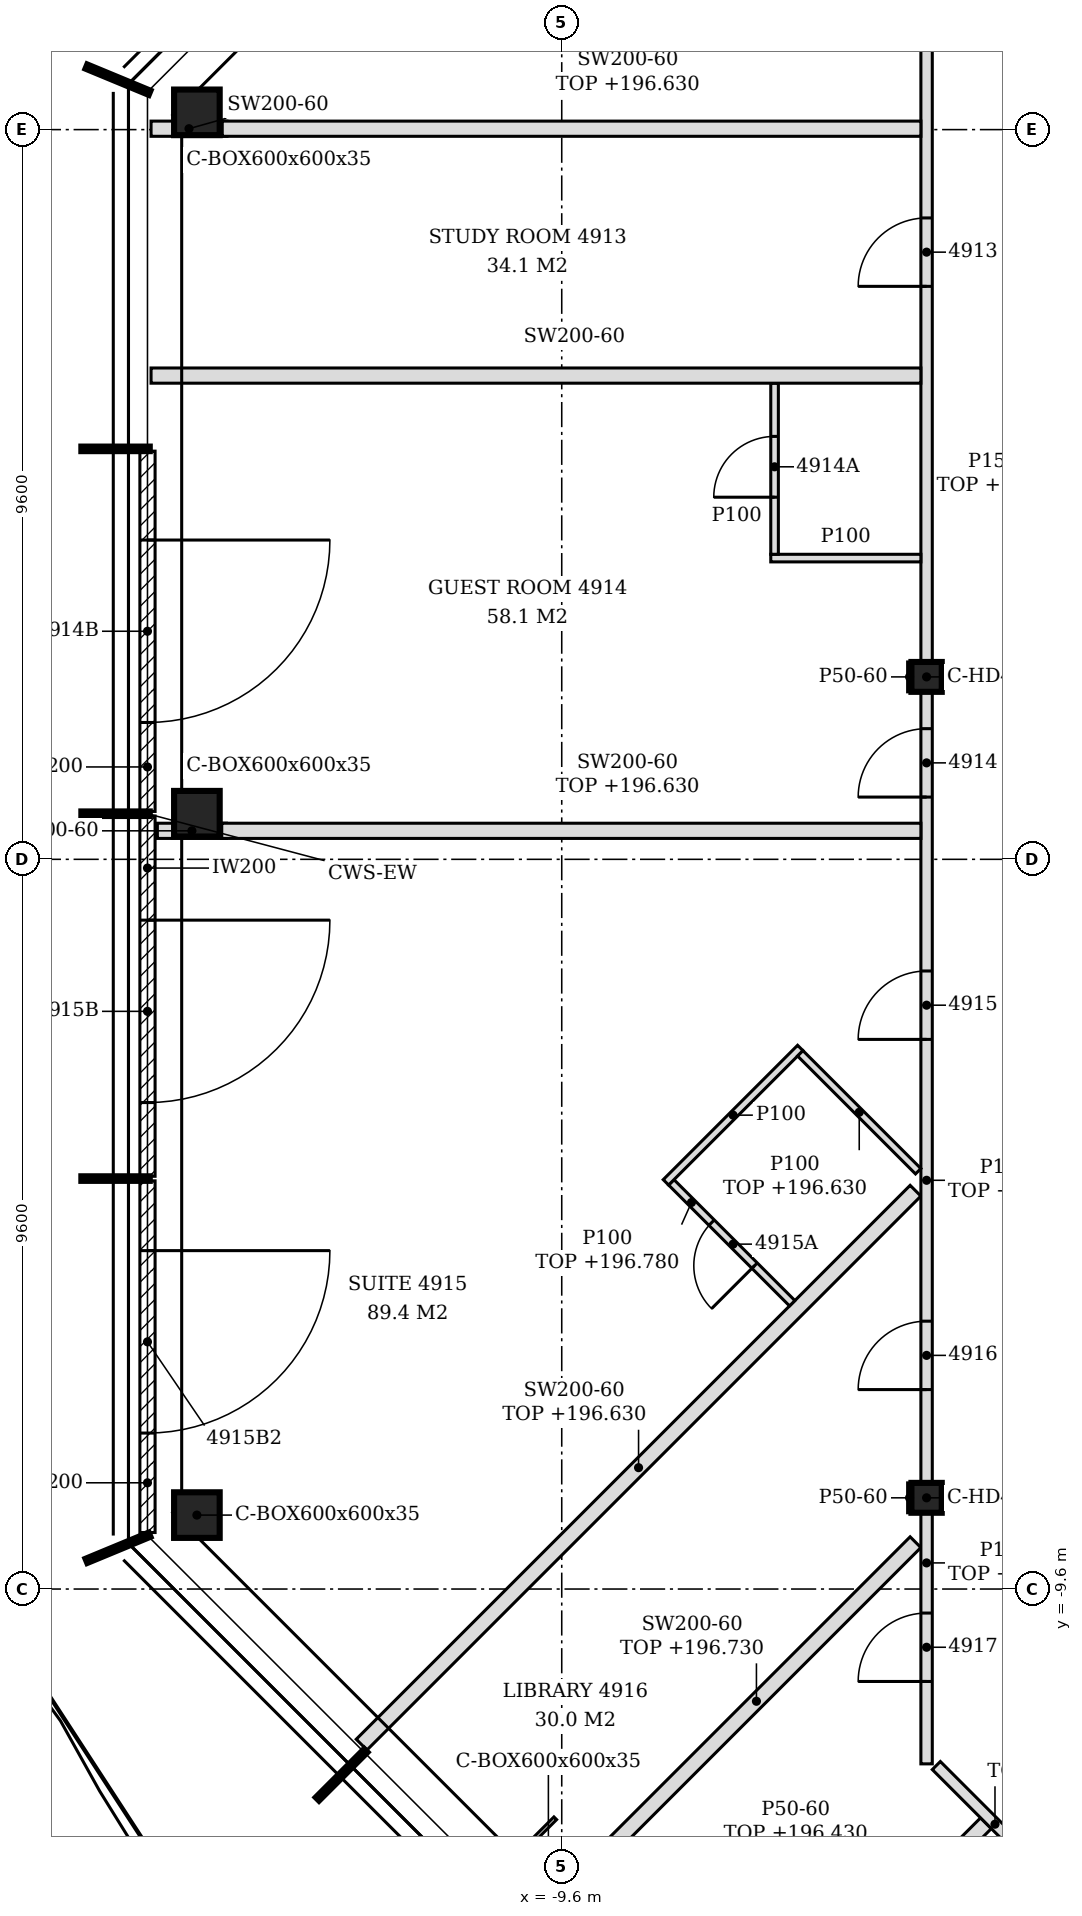
"""IFC4 building model, lengths in metres.
Left out: names, types, materials, properties, quantities, classifications, styles, units other than length and angle.
Written with IfcOpenShell. Run it as: python <this file> out.ifc"""

import sys

from ifc_helpers import new_model, si_unit, direction, frame, frame_2d, origin, origin_2d, place, context, subcontext, project, spatial, polyline, rectangle, hollow_rectangle, i_section, outline, extrude, clip, halfspace, element, fill, save


model = new_model("IFC4")
c1 = context("Model", 3, precision=1e-05, world=origin(), true_north=direction((0.0, 1.0)))
c2 = subcontext(c1, "Body", "Model", "MODEL_VIEW")
j1 = project(units=[si_unit("LENGTHUNIT", "METRE"), si_unit("PLANEANGLEUNIT", "RADIAN")], contexts=[c1])
p1 = place(None, origin())
s1 = spatial("IfcSite", under=j1, at=p1, CompositionType="ELEMENT")
p2 = place(p1, origin())
s2 = spatial("IfcBuilding", under=s1, at=p2, CompositionType="ELEMENT")
p3 = place(p2, frame((0.0, 0.0, 193.8)))
s3 = spatial("IfcBuildingStorey", under=s2, at=p3, CompositionType="ELEMENT", Elevation=193.8)
p4 = place(p3, frame((-14.4, 9.827, -0.15), z_axis=(0.182857646312, -0.121927149838, 0.975549512489), x_axis=(0.554769659169, 0.83200398152, 0.0)))
e1 = element("IfcColumn", 1, at=p4, inside=s3, PredefinedType="COLUMN", context=c2, shape_type="Clipping", body=[
    clip(clip(extrude(hollow_rectangle(XDim=0.6, YDim=0.6, WallThickness=0.035, at=origin_2d()), origin(), (0.0, 0.0, 1.0), 3.69), halfspace(frame((0.0, 0.0, 0.021), z_axis=(0.0, 0.0, 1.0), x_axis=(1.0, 0.0, 0.0)), True)), halfspace(frame((0.0, 0.0, 3.668), z_axis=(0.0, 0.0, 1.0), x_axis=(1.0, 0.0, 0.0)), False)),
])
p5 = place(p3, frame((-14.4, 0.6, -0.15), z_axis=(0.182856170941, -0.121992322437, 0.975541641354), x_axis=(0.55497797841, 0.831865039222, 0.0)))
e2 = element("IfcColumn", 2, at=p5, inside=s3, PredefinedType="COLUMN", context=c2, shape_type="Clipping", body=[
    clip(clip(extrude(hollow_rectangle(XDim=0.6, YDim=0.6, WallThickness=0.035, at=origin_2d()), origin(), (0.0, 0.0, 1.0), 3.69), halfspace(frame((0.0, 0.0, 0.021), z_axis=(0.0, 0.0, 1.0), x_axis=(1.0, 0.0, 0.0)), True)), halfspace(frame((0.0, 0.0, 3.668), z_axis=(0.0, 0.0, 1.0), x_axis=(1.0, 0.0, 0.0)), False)),
])
p6 = place(p3, frame((-14.4, -8.627, -0.15), z_axis=(0.182857646312, -0.121927149838, 0.975549512489), x_axis=(0.554769659169, 0.83200398152, 0.0)))
e3 = element("IfcColumn", 3, at=p6, inside=s3, PredefinedType="COLUMN", context=c2, shape_type="Clipping", body=[
    clip(clip(extrude(hollow_rectangle(XDim=0.6, YDim=0.6, WallThickness=0.035, at=origin_2d()), origin(), (0.0, 0.0, 1.0), 3.69), halfspace(frame((0.0, 0.0, 0.021), z_axis=(0.0, 0.0, 1.0), x_axis=(1.0, 0.0, 0.0)), True)), halfspace(frame((0.0, 0.0, 3.668), z_axis=(0.0, 0.0, 1.0), x_axis=(1.0, 0.0, 0.0)), False)),
])
p7 = place(p3, frame((-9.776, -13.251, -0.15), z_axis=(0.18292158996, -0.12192567461, 0.97553770906), x_axis=(0.55463074681, 0.832096589761, 0.0)))
e4 = element("IfcColumn", 4, at=p7, inside=s3, PredefinedType="COLUMN", context=c2, shape_type="Clipping", body=[
    clip(clip(extrude(hollow_rectangle(XDim=0.6, YDim=0.6, WallThickness=0.035, at=origin_2d()), origin(), (0.0, 0.0, 1.0), 3.69), halfspace(frame((0.0, 0.0, 0.021), z_axis=(0.0, 0.0, 1.0), x_axis=(1.0, 0.0, 0.0)), True)), halfspace(frame((0.0, 0.0, 3.668), z_axis=(0.0, 0.0, 1.0), x_axis=(1.0, 0.0, 0.0)), False)),
])
for number, where, z_axis, x_axis in (
    (5, (-4.8, -8.4, -0.15), (0.0, 0.0, 1.0), (1.0, 0.0, 0.0)),
    (6, (-4.8, 2.4, -0.15), (0.0, 0.0, 1.0), (1.0, 0.0, 0.0)),
):
    element("IfcColumn", number, at=place(p3, frame(where, z_axis=z_axis, x_axis=x_axis)), inside=s3, PredefinedType="COLUMN", context=c2, shape_type="SweptSolid", body=[
        extrude(i_section(OverallWidth=0.399, OverallDepth=0.393, WebThickness=0.023, FlangeThickness=0.037, FilletRadius=0.015, at=origin_2d()), origin(), (0.0, 0.0, 1.0), 3.6),
    ])
p8 = place(p3, frame((-15.05, 5.37, 0.0), z_axis=(0.0, 0.0, 1.0), x_axis=(0.0, -1.0, 0.0)))
e7 = element("IfcWall", 7, at=p8, inside=s3, PredefinedType="NOTDEFINED", context=c2, shape_type="SweptSolid", body=[
    extrude(rectangle(XDim=4.74, YDim=0.2, at=frame_2d((2.37, 0.0))), origin(), (0.0, 0.0, 1.0), 3.45),
])
p9 = place(p8, frame((1.169, 0.0, 0.0)))
e8 = element("IfcOpeningElement", 8, at=p9, cuts=e7, PredefinedType="OPENING", context=c2, shape_type="SweptSolid", body=[
    extrude(rectangle(XDim=2.4, YDim=2.4, at=frame_2d((1.2, 1.2))), frame((0.0, 0.11, 0.0), z_axis=(0.0, -1.0, 0.0), x_axis=(1.0, 0.0, 0.0)), (0.0, 0.0, 1.0), 0.22),
])
p10 = place(p3, frame((-15.05, 0.57, 0.0), z_axis=(0.0, 0.0, 1.0), x_axis=(0.0, -1.0, 0.0)))
e9 = element("IfcWall", 9, at=p10, inside=s3, PredefinedType="NOTDEFINED", context=c2, shape_type="SweptSolid", body=[
    extrude(rectangle(XDim=4.74, YDim=0.2, at=frame_2d((2.37, 0.0))), origin(), (0.0, 0.0, 1.0), 3.45),
])
p11 = place(p10, frame((1.37, 0.0, 0.0)))
e10 = element("IfcOpeningElement", 10, at=p11, cuts=e9, PredefinedType="OPENING", context=c2, shape_type="SweptSolid", body=[
    extrude(rectangle(XDim=2.4, YDim=2.4, at=frame_2d((1.2, 1.2))), frame((0.0, 0.11, 0.0), z_axis=(0.0, -1.0, 0.0), x_axis=(1.0, 0.0, 0.0)), (0.0, 0.0, 1.0), 0.22),
])
p12 = place(p3, frame((-15.05, -4.23, 0.0), z_axis=(0.0, 0.0, 1.0), x_axis=(0.0, -1.0, 0.0)))
e11 = element("IfcWall", 11, at=p12, inside=s3, PredefinedType="NOTDEFINED", context=c2, shape_type="SweptSolid", body=[
    extrude(rectangle(XDim=4.626, YDim=0.2, at=frame_2d((2.313, 0.0))), origin(), (0.0, 0.0, 1.0), 3.45),
])
p13 = place(p12, frame((0.918, 0.0, 0.0)))
e12 = element("IfcOpeningElement", 12, at=p13, cuts=e11, PredefinedType="OPENING", context=c2, shape_type="SweptSolid", body=[
    extrude(rectangle(XDim=2.4, YDim=2.4, at=frame_2d((1.2, 1.2))), frame((0.0, 0.11, 0.0), z_axis=(0.0, -1.0, 0.0), x_axis=(1.0, 0.0, 0.0)), (0.0, 0.0, 1.0), 0.22),
])
p14 = place(p3, frame((-7.6, -16.262, 0.0), z_axis=(0.0, 0.0, 1.0), x_axis=(0.707106781187, 0.707106781187, 0.0)))
e13 = element("IfcWall", 13, at=p14, inside=s3, PredefinedType="PARTITIONING", context=c2, shape_type="SweptSolid", body=[
    extrude(rectangle(XDim=5.064, YDim=0.2, at=frame_2d((2.532, 0.0))), origin(), (0.0, 0.0, 1.0), 2.63),
])
p15 = place(p3, frame((-1.654, -14.94, 0.0), z_axis=(0.0, 0.0, 1.0), x_axis=(-0.707106781187, 0.707106781187, 0.0)))
e14 = element("IfcWall", 14, at=p15, inside=s3, PredefinedType="PARTITIONING", context=c2, shape_type="SweptSolid", body=[
    extrude(rectangle(XDim=4.268, YDim=0.15, at=frame_2d((2.134, 0.0))), origin(), (0.0, 0.0, 1.0), 2.88),
])
p16 = place(p15, frame((1.185, 0.0, 0.0)))
e15 = element("IfcOpeningElement", 15, at=p16, cuts=e14, PredefinedType="OPENING", context=c2, shape_type="SweptSolid", body=[
    extrude(rectangle(XDim=0.9, YDim=2.1, at=frame_2d((0.45, 1.05))), frame((0.0, 0.085, 0.0), z_axis=(0.0, -1.0, 0.0), x_axis=(1.0, 0.0, 0.0)), (0.0, 0.0, 1.0), 0.17),
])
p17 = place(p3, frame((-9.131, -13.169, 0.0), z_axis=(0.0, 0.0, 1.0), x_axis=(0.707086158914, 0.707127402857, 0.0)))
e16 = element("IfcWall", 16, at=p17, inside=s3, PredefinedType="PARTITIONING", context=c2, shape_type="SweptSolid", body=[
    extrude(rectangle(XDim=5.919, YDim=0.2, at=frame_2d((2.96, 0.0))), origin(), (0.0, 0.0, 1.0), 2.93),
])
p18 = place(p3, frame((-4.8, -11.9, 0.0), z_axis=(0.0, 0.0, 1.0), x_axis=(0.0, 1.0, 0.0)))
e17 = element("IfcWall", 17, at=p18, inside=s3, PredefinedType="PARTITIONING", context=c2, shape_type="SweptSolid", body=[
    extrude(rectangle(XDim=3.304, YDim=0.15, at=frame_2d((1.652, 0.0))), origin(), (0.0, 0.0, 1.0), 2.93),
])
p19 = place(p18, frame((1.084, 0.0, 0.0)))
e18 = element("IfcOpeningElement", 18, at=p19, cuts=e17, PredefinedType="OPENING", context=c2, shape_type="SweptSolid", body=[
    extrude(rectangle(XDim=0.9, YDim=2.1, at=frame_2d((0.45, 1.05))), frame((0.0, 0.085, 0.0), z_axis=(0.0, -1.0, 0.0), x_axis=(1.0, 0.0, 0.0)), (0.0, 0.0, 1.0), 0.17),
])
p20 = place(p3, frame((-12.233, -11.647, 0.0), z_axis=(0.0, 0.0, 1.0), x_axis=(0.707094936157, 0.707118626017, 0.0)))
e19 = element("IfcWall", 19, at=p20, inside=s3, PredefinedType="PARTITIONING", context=c2, shape_type="SweptSolid", body=[
    extrude(rectangle(XDim=10.306, YDim=0.2, at=frame_2d((5.153, 0.0))), origin(), (0.0, 0.0, 1.0), 2.83),
])
p21 = place(p3, frame((-4.8, -8.204, 0.0), z_axis=(0.0, 0.0, 1.0), x_axis=(0.0, 1.0, 0.0)))
e20 = element("IfcWall", 20, at=p21, inside=s3, PredefinedType="PARTITIONING", context=c2, shape_type="SweptSolid", body=[
    extrude(rectangle(XDim=10.407, YDim=0.15, at=frame_2d((5.204, 0.0))), origin(), (0.0, 0.0, 1.0), 2.83),
])
p22 = place(p21, frame((9.022, 0.0, 0.0)))
e21 = element("IfcOpeningElement", 21, at=p22, cuts=e20, PredefinedType="OPENING", context=c2, shape_type="SweptSolid", body=[
    extrude(rectangle(XDim=0.9, YDim=2.1, at=frame_2d((0.45, 1.05))), frame((0.0, 0.085, 0.0), z_axis=(0.0, -1.0, 0.0), x_axis=(1.0, 0.0, 0.0)), (0.0, 0.0, 1.0), 0.17),
])
p23 = place(p21, frame((5.834, 0.0, 0.0)))
e22 = element("IfcOpeningElement", 22, at=p23, cuts=e20, PredefinedType="OPENING", context=c2, shape_type="SweptSolid", body=[
    extrude(rectangle(XDim=0.9, YDim=2.1, at=frame_2d((0.45, 1.05))), frame((0.0, 0.085, 0.0), z_axis=(0.0, -1.0, 0.0), x_axis=(1.0, 0.0, 0.0)), (0.0, 0.0, 1.0), 0.17),
])
p24 = place(p21, frame((1.228, 0.0, 0.0)))
e23 = element("IfcOpeningElement", 23, at=p24, cuts=e20, PredefinedType="OPENING", context=c2, shape_type="SweptSolid", body=[
    extrude(rectangle(XDim=0.9, YDim=2.1, at=frame_2d((0.45, 1.05))), frame((0.0, 0.085, 0.0), z_axis=(0.0, -1.0, 0.0), x_axis=(1.0, 0.0, 0.0)), (0.0, 0.0, 1.0), 0.17),
])
p25 = place(p3, frame((-6.568, -5.84, 0.0), z_axis=(0.0, 0.0, 1.0), x_axis=(-0.70716103421, 0.707052524, 0.0)))
e24 = element("IfcWall", 24, at=p25, inside=s3, PredefinedType="PARTITIONING", context=c2, shape_type="SweptSolid", body=[
    extrude(rectangle(XDim=2.25, YDim=0.1, at=frame_2d((1.125, 0.0))), origin(), (0.0, 0.0, 1.0), 2.98),
])
p26 = place(p25, frame((0.7, 0.0, 0.0)))
e25 = element("IfcOpeningElement", 25, at=p26, cuts=e24, PredefinedType="OPENING", context=c2, shape_type="SweptSolid", body=[
    extrude(rectangle(XDim=0.8, YDim=2.1, at=frame_2d((0.4, 1.05))), frame((0.0, 0.06, 0.0), z_axis=(0.0, -1.0, 0.0), x_axis=(1.0, 0.0, 0.0)), (0.0, 0.0, 1.0), 0.12),
])
p27 = place(p3, frame((-8.229, -4.25, 0.0), z_axis=(0.0, 0.0, 1.0), x_axis=(0.707106781187, 0.707106781187, 0.0)))
e26 = element("IfcWall", 26, at=p27, inside=s3, PredefinedType="PARTITIONING", context=c2, shape_type="SweptSolid", body=[
    extrude(rectangle(XDim=2.5, YDim=0.1, at=frame_2d((1.25, 0.0))), origin(), (0.0, 0.0, 1.0), 3.45),
])
p28 = place(p3, frame((-4.91, -4.104, 0.0), z_axis=(0.0, 0.0, 1.0), x_axis=(-0.707106781187, 0.707106781187, 0.0)))
e27 = element("IfcWall", 27, at=p28, inside=s3, PredefinedType="PARTITIONING", context=c2, shape_type="SweptSolid", body=[
    extrude(rectangle(XDim=2.194, YDim=0.1, at=frame_2d((1.097, 0.0))), origin(), (0.0, 0.0, 1.0), 2.83),
])
p29 = place(p3, frame((-14.92, 0.375, 0.0), z_axis=(0.0, 0.0, 1.0), x_axis=(1.0, 0.0, 0.0)))
e28 = element("IfcWall", 28, at=p29, inside=s3, PredefinedType="PARTITIONING", context=c2, shape_type="SweptSolid", body=[
    extrude(outline(polyline([(0.0, 0.0), (0.167, 0.0), (0.288, 0.863), (0.449, 1.725), (0.675, 2.587), (0.909, 3.45), (0.0, 3.45), (0.0, 2.587), (0.0, 1.725), (0.0, 0.863), (0.0, 0.0)])), frame((0.0, 0.1, 0.0), z_axis=(0.0, -1.0, 0.0), x_axis=(1.0, 0.0, 0.0)), (0.0, 0.0, 1.0), 0.2),
])
p30 = place(p3, frame((-14.073, 0.375, 0.0), z_axis=(0.0, 0.0, 1.0), x_axis=(1.0, 0.0, 0.0)))
e29 = element("IfcWall", 29, at=p30, inside=s3, PredefinedType="PARTITIONING", context=c2, shape_type="SweptSolid", body=[
    extrude(outline(polyline([(0.0, 0.0), (9.198, 0.0), (9.198, 0.863), (9.198, 1.725), (9.198, 2.587), (9.198, 2.83), (0.635, 2.83), (0.609, 2.587), (0.447, 1.725), (0.234, 0.863), (0.0, 0.0)])), frame((0.0, 0.1, 0.0), z_axis=(0.0, -1.0, 0.0), x_axis=(1.0, 0.0, 0.0)), (0.0, 0.0, 1.0), 0.2),
])
p31 = place(p3, frame((-4.8, 2.596, 0.0), z_axis=(0.0, 0.0, 1.0), x_axis=(0.0, 1.0, 0.0)))
e30 = element("IfcWall", 30, at=p31, inside=s3, PredefinedType="PARTITIONING", context=c2, shape_type="SweptSolid", body=[
    extrude(rectangle(XDim=10.407, YDim=0.15, at=frame_2d((5.204, 0.0))), origin(), (0.0, 0.0, 1.0), 2.83),
])
p32 = place(p31, frame((4.941, 0.0, 0.0)))
e31 = element("IfcOpeningElement", 31, at=p32, cuts=e30, PredefinedType="OPENING", context=c2, shape_type="SweptSolid", body=[
    extrude(rectangle(XDim=0.9, YDim=2.1, at=frame_2d((0.45, 1.05))), frame((0.0, 0.085, 0.0), z_axis=(0.0, -1.0, 0.0), x_axis=(1.0, 0.0, 0.0)), (0.0, 0.0, 1.0), 0.17),
])
p33 = place(p3, frame((-6.85, 3.963, 0.0), z_axis=(0.0, 0.0, 1.0), x_axis=(1.0, 0.0, 0.0)))
e32 = element("IfcWall", 32, at=p33, inside=s3, PredefinedType="PARTITIONING", context=c2, shape_type="SweptSolid", body=[
    extrude(outline(polyline([(0.0, 0.0), (1.975, 0.0), (1.975, 2.83), (1.9, 2.83), (1.898, 3.45), (0.0, 3.45), (0.0, 0.0)])), frame((0.0, 0.05, 0.0), z_axis=(0.0, -1.0, 0.0), x_axis=(1.0, 0.0, 0.0)), (0.0, 0.0, 1.0), 0.1),
])
p34 = place(p3, frame((-6.8, 4.013, 0.0), z_axis=(0.0, 0.0, 1.0), x_axis=(0.0, 1.0, 0.0)))
e33 = element("IfcWall", 33, at=p34, inside=s3, PredefinedType="PARTITIONING", context=c2, shape_type="SweptSolid", body=[
    extrude(outline(polyline([(0.0, 0.0), (2.251, 0.0), (2.251, 3.45), (1.032, 3.45), (1.03, 2.98), (0.842, 2.98), (0.84, 3.45), (0.0, 3.45), (0.0, 0.0)])), frame((0.0, 0.05, 0.0), z_axis=(0.0, -1.0, 0.0), x_axis=(1.0, 0.0, 0.0)), (0.0, 0.0, 1.0), 0.1),
])
p35 = place(p34, frame((0.751, 0.0, 0.0)))
e34 = element("IfcOpeningElement", 34, at=p35, cuts=e33, PredefinedType="OPENING", context=c2, shape_type="SweptSolid", body=[
    extrude(rectangle(XDim=0.8, YDim=2.1, at=frame_2d((0.4, 1.05))), frame((0.0, 0.06, 0.0), z_axis=(0.0, -1.0, 0.0), x_axis=(1.0, 0.0, 0.0)), (0.0, 0.0, 1.0), 0.12),
])
p36 = place(p3, frame((-15.003, 6.364, 0.0), z_axis=(0.0, 0.0, 1.0), x_axis=(1.0, 0.0, 0.0)))
e35 = element("IfcWall", 35, at=p36, inside=s3, PredefinedType="PARTITIONING", context=c2, shape_type="SweptSolid", body=[
    extrude(outline(polyline([(0.0, 0.0), (10.128, 0.0), (10.128, 2.83), (10.053, 2.83), (10.051, 3.45), (1.428, 3.45), (1.426, 2.93), (1.128, 2.93), (1.126, 3.45), (0.0, 3.45), (0.0, 0.0)])), frame((0.0, 0.1, 0.0), z_axis=(0.0, -1.0, 0.0), x_axis=(1.0, 0.0, 0.0)), (0.0, 0.0, 1.0), 0.2),
])
p37 = place(p3, frame((-15.003, 9.612, 0.0), z_axis=(0.0, 0.0, 1.0), x_axis=(1.0, 0.0, 0.0)))
e36 = element("IfcWall", 36, at=p37, inside=s3, PredefinedType="PARTITIONING", context=c2, shape_type="SweptSolid", body=[
    extrude(outline(polyline([(0.0, 0.0), (0.235, 0.0), (0.371, 0.863), (0.532, 1.725), (0.765, 2.587), (0.998, 3.45), (0.0, 3.45), (0.0, 2.587), (0.0, 1.725), (0.0, 0.863), (0.0, 0.0)])), frame((0.0, 0.1, 0.0), z_axis=(0.0, -1.0, 0.0), x_axis=(1.0, 0.0, 0.0)), (0.0, 0.0, 1.0), 0.2),
])
p38 = place(p3, frame((-14.067, 9.612, 0.0), z_axis=(0.0, 0.0, 1.0), x_axis=(1.0, 0.0, 0.0)))
e37 = element("IfcWall", 37, at=p38, inside=s3, PredefinedType="PARTITIONING", context=c2, shape_type="SweptSolid", body=[
    extrude(outline(polyline([(0.0, 0.0), (9.192, 0.0), (9.192, 0.863), (9.192, 1.725), (9.192, 2.587), (9.192, 2.83), (0.624, 2.83), (0.602, 2.587), (0.44, 1.725), (0.234, 0.863), (0.0, 0.0)])), frame((0.0, 0.1, 0.0), z_axis=(0.0, -1.0, 0.0), x_axis=(1.0, 0.0, 0.0)), (0.0, 0.0, 1.0), 0.2),
])
p39 = place(p3, frame((-10.299, -13.229, 0.0), z_axis=(0.0, 0.0, 1.0), x_axis=(0.707106781187, 0.707106781187, 0.0)))
e38 = element("IfcWall", 38, at=p39, inside=s3, PredefinedType="PARTITIONING", context=c2, shape_type="SweptSolid", body=[
    extrude(rectangle(XDim=0.868, YDim=0.05, at=frame_2d((0.434, 0.0))), origin(), (0.0, 0.0, 1.0), 2.93),
])
for number, where, z_axis, x_axis in (
    (39, (-5.024, -8.596, 0.0), (0.0, 0.0, 1.0), (0.0, 1.0, 0.0)),
    (40, (-5.024, 2.204, 0.0), (0.0, 0.0, 1.0), (0.0, 1.0, 0.0)),
):
    element("IfcWall", number, at=place(p3, frame(where, z_axis=z_axis, x_axis=x_axis)), inside=s3, PredefinedType="PARTITIONING", context=c2, shape_type="SweptSolid", body=[
        extrude(rectangle(XDim=0.393, YDim=0.05, at=frame_2d((0.196, 0.0))), origin(), (0.0, 0.0, 1.0), 3.45),
    ])
p40 = place(p9, origin())
e41 = element("IfcDoor", 41, at=p40, inside=s3, OperationType="SINGLE_SWING_LEFT", PredefinedType="DOOR", context=c2, shape_type="SweptSolid", body=[
    extrude(rectangle(XDim=2.4, YDim=2.4, at=frame_2d((1.2, 1.2))), frame((0.0, 0.025, 0.0), z_axis=(0.0, -1.0, 0.0), x_axis=(1.0, 0.0, 0.0)), (0.0, 0.0, 1.0), 0.05),
])
fill(e8, e41)
p41 = place(p11, origin())
e42 = element("IfcDoor", 42, at=p41, inside=s3, OperationType="SINGLE_SWING_LEFT", PredefinedType="DOOR", context=c2, shape_type="SweptSolid", body=[
    extrude(rectangle(XDim=2.4, YDim=2.4, at=frame_2d((1.2, 1.2))), frame((0.0, 0.025, 0.0), z_axis=(0.0, -1.0, 0.0), x_axis=(1.0, 0.0, 0.0)), (0.0, 0.0, 1.0), 0.05),
])
fill(e10, e42)
p42 = place(p13, origin())
e43 = element("IfcDoor", 43, at=p42, inside=s3, OperationType="SINGLE_SWING_LEFT", PredefinedType="DOOR", context=c2, shape_type="SweptSolid", body=[
    extrude(rectangle(XDim=2.4, YDim=2.4, at=frame_2d((1.2, 1.2))), frame((0.0, 0.025, 0.0), z_axis=(0.0, -1.0, 0.0), x_axis=(1.0, 0.0, 0.0)), (0.0, 0.0, 1.0), 0.05),
])
fill(e12, e43)
p43 = place(p32, origin())
e44 = element("IfcDoor", 44, at=p43, inside=s3, OperationType="SINGLE_SWING_LEFT", PredefinedType="DOOR", context=c2, shape_type="SweptSolid", body=[
    extrude(rectangle(XDim=0.9, YDim=2.1, at=frame_2d((0.45, 1.05))), frame((0.0, 0.025, 0.0), z_axis=(0.0, -1.0, 0.0), x_axis=(1.0, 0.0, 0.0)), (0.0, 0.0, 1.0), 0.05),
])
fill(e31, e44)
p44 = place(p22, origin())
e45 = element("IfcDoor", 45, at=p44, inside=s3, OperationType="SINGLE_SWING_LEFT", PredefinedType="DOOR", context=c2, shape_type="SweptSolid", body=[
    extrude(rectangle(XDim=0.9, YDim=2.1, at=frame_2d((0.45, 1.05))), frame((0.0, 0.025, 0.0), z_axis=(0.0, -1.0, 0.0), x_axis=(1.0, 0.0, 0.0)), (0.0, 0.0, 1.0), 0.05),
])
fill(e21, e45)
p45 = place(p35, origin())
e46 = element("IfcDoor", 46, at=p45, inside=s3, OperationType="SINGLE_SWING_LEFT", PredefinedType="DOOR", context=c2, shape_type="SweptSolid", body=[
    extrude(rectangle(XDim=0.8, YDim=2.1, at=frame_2d((0.4, 1.05))), frame((0.0, 0.025, 0.0), z_axis=(0.0, -1.0, 0.0), x_axis=(1.0, 0.0, 0.0)), (0.0, 0.0, 1.0), 0.05),
])
fill(e34, e46)
p46 = place(p23, origin())
e47 = element("IfcDoor", 47, at=p46, inside=s3, OperationType="SINGLE_SWING_LEFT", PredefinedType="DOOR", context=c2, shape_type="SweptSolid", body=[
    extrude(rectangle(XDim=0.9, YDim=2.1, at=frame_2d((0.45, 1.05))), frame((0.0, 0.025, 0.0), z_axis=(0.0, -1.0, 0.0), x_axis=(1.0, 0.0, 0.0)), (0.0, 0.0, 1.0), 0.05),
])
fill(e22, e47)
p47 = place(p26, origin())
e48 = element("IfcDoor", 48, at=p47, inside=s3, OperationType="SINGLE_SWING_LEFT", PredefinedType="DOOR", context=c2, shape_type="SweptSolid", body=[
    extrude(rectangle(XDim=0.8, YDim=2.1, at=frame_2d((0.4, 1.05))), frame((0.0, 0.025, 0.0), z_axis=(0.0, -1.0, 0.0), x_axis=(1.0, 0.0, 0.0)), (0.0, 0.0, 1.0), 0.05),
])
fill(e25, e48)
p48 = place(p24, origin())
e49 = element("IfcDoor", 49, at=p48, inside=s3, OperationType="SINGLE_SWING_LEFT", PredefinedType="DOOR", context=c2, shape_type="SweptSolid", body=[
    extrude(rectangle(XDim=0.9, YDim=2.1, at=frame_2d((0.45, 1.05))), frame((0.0, 0.025, 0.0), z_axis=(0.0, -1.0, 0.0), x_axis=(1.0, 0.0, 0.0)), (0.0, 0.0, 1.0), 0.05),
])
fill(e23, e49)
p49 = place(p19, origin())
e50 = element("IfcDoor", 50, at=p49, inside=s3, OperationType="SINGLE_SWING_LEFT", PredefinedType="DOOR", context=c2, shape_type="SweptSolid", body=[
    extrude(rectangle(XDim=0.9, YDim=2.1, at=frame_2d((0.45, 1.05))), frame((0.0, 0.025, 0.0), z_axis=(0.0, -1.0, 0.0), x_axis=(1.0, 0.0, 0.0)), (0.0, 0.0, 1.0), 0.05),
])
fill(e18, e50)
save(model, sys.argv[1])
